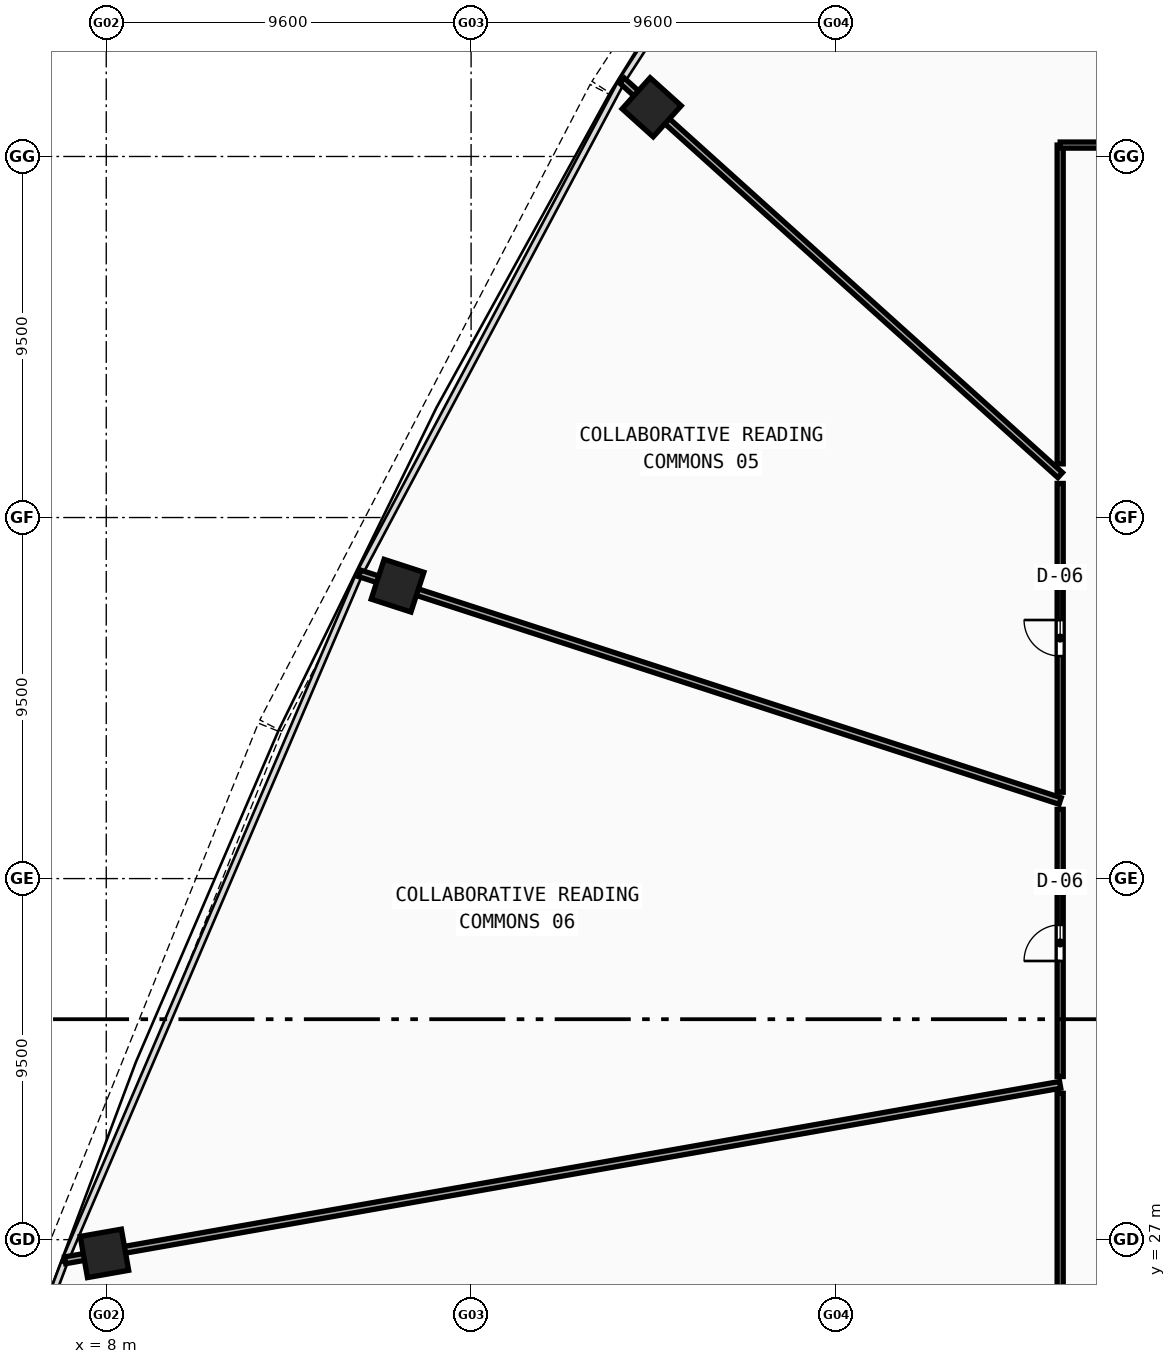
"""IFC4 building model, lengths in metres.
Left out: names, types, materials, properties, quantities, classifications, styles, units other than length and angle.
Written with IfcOpenShell. Run it as: python <this file> out.ifc"""

import sys

from ifc_helpers import new_model, si_unit, direction, frame, frame_2d, origin, origin_with_axes, origin_2d, place, context, subcontext, project, spatial, rectangle, hollow_rectangle, extrude, source, transform, mapped, element, fill, save


model = new_model("IFC4")
c1 = context("Model", 3, precision=1e-05, world=origin(), true_north=direction((0.0, 1.0)))
c2 = subcontext(c1, "Body", "Model", "MODEL_VIEW")
j1 = project(units=[si_unit("LENGTHUNIT", "METRE"), si_unit("PLANEANGLEUNIT", "RADIAN")], contexts=[c1])
p1 = place(None, origin())
s1 = spatial("IfcSite", under=j1, at=p1, CompositionType="ELEMENT")
p2 = place(p1, origin())
s2 = spatial("IfcBuilding", under=s1, at=p2, CompositionType="ELEMENT")
p3 = place(p2, frame((0.0, 0.0, 70.33)))
s3 = spatial("IfcBuildingStorey", under=s2, at=p3, CompositionType="ELEMENT", Elevation=70.33)
m1 = source(origin(), c2, "Body", "SweptSolid", [
    extrude(hollow_rectangle(XDim=1.1, YDim=1.1, WallThickness=0.045, at=origin_2d()), origin(), (0.0, 0.0, 1.0), 6.03),
])
for number, where, z_axis, x_axis in (
    (1, (22.351, 56.794, -0.26), (0.0, 0.0, 1.0), (-0.669, -0.743, 0.0)),
    (2, (15.665, 44.206, -0.26), (0.0, 0.0, 1.0), (-0.309, -0.951, 0.0)),
    (3, (7.952, 26.638, -0.26), (0.0, 0.0, 1.0), (0.174, -0.985, 0.0)),
):
    element("IfcColumn", number, at=place(p3, frame(where, z_axis=z_axis, x_axis=x_axis)), inside=s3, PredefinedType="COLUMN", context=c2, shape_type="MappedRepresentation", body=[
        mapped(m1, transform((0.0, 0.0, 0.0), scale=1.0)),
    ])
p4 = place(p3, frame((33.1, 47.116, 0.0), z_axis=(0.0, 0.0, 1.0), x_axis=(-0.743143105339, 0.669132516761, 0.0)))
e4 = element("IfcWall", 4, at=p4, inside=s3, PredefinedType="PARTITIONING", context=c2, shape_type="SweptSolid", body=[
    extrude(rectangle(XDim=15.514, YDim=0.18, at=frame_2d((7.757, 0.0))), origin(), (0.0, 0.0, 1.0), 2.42),
])
p5 = place(p3, frame((33.1, 38.541, 0.0), z_axis=(0.0, 0.0, 1.0), x_axis=(-0.951054245528, 0.309023982992, 0.0)))
e5 = element("IfcWall", 5, at=p5, inside=s3, PredefinedType="PARTITIONING", context=c2, shape_type="SweptSolid", body=[
    extrude(rectangle(XDim=19.383, YDim=0.18, at=frame_2d((9.691, 0.0))), origin(), (0.0, 0.0, 1.0), 2.42),
])
p6 = place(p3, frame((33.1, 31.073, 0.0), z_axis=(0.0, 0.0, 1.0), x_axis=(-0.984808509529, -0.173643887195, 0.0)))
e6 = element("IfcWall", 6, at=p6, inside=s3, PredefinedType="PARTITIONING", context=c2, shape_type="SweptSolid", body=[
    extrude(rectangle(XDim=26.586, YDim=0.18, at=frame_2d((13.293, 0.0))), origin(), (0.0, 0.0, 1.0), 2.42),
])
p7 = place(p3, frame((33.1, 24.8, 0.0), z_axis=(0.0, 0.0, 1.0), x_axis=(0.0, 1.0, 0.0)))
e7 = element("IfcWall", 7, at=p7, inside=s3, PredefinedType="PARTITIONING", context=c2, shape_type="SweptSolid", body=[
    extrude(rectangle(XDim=6.049, YDim=0.16, at=frame_2d((3.025, 0.0))), origin(), (0.0, 0.0, 1.0), 2.42),
])
p8 = place(p3, frame((33.1, 31.292, 0.0), z_axis=(0.0, 0.0, 1.0), x_axis=(0.0, 1.0, 0.0)))
e8 = element("IfcWall", 8, at=p8, inside=s3, PredefinedType="PARTITIONING", context=c2, shape_type="SweptSolid", body=[
    extrude(rectangle(XDim=7.029, YDim=0.16, at=frame_2d((3.515, 0.0))), origin(), (0.0, 0.0, 1.0), 2.42),
])
p9 = place(p8, frame((3.04, 0.0, 0.0)))
e9 = element("IfcOpeningElement", 9, at=p9, cuts=e8, PredefinedType="OPENING", context=c2, shape_type="SweptSolid", body=[
    extrude(rectangle(XDim=0.95, YDim=2.1, at=frame_2d((0.475, 1.05))), frame((0.0, 0.09, 0.0), z_axis=(0.0, -1.0, 0.0), x_axis=(1.0, 0.0, 0.0)), (0.0, 0.0, 1.0), 0.18),
])
p10 = place(p3, frame((33.1, 38.773, 0.0), z_axis=(0.0, 0.0, 1.0), x_axis=(0.0, 1.0, 0.0)))
e10 = element("IfcWall", 10, at=p10, inside=s3, PredefinedType="PARTITIONING", context=c2, shape_type="SweptSolid", body=[
    extrude(rectangle(XDim=8.124, YDim=0.16, at=frame_2d((4.062, 0.0))), origin(), (0.0, 0.0, 1.0), 2.42),
])
p11 = place(p10, frame((3.581, 0.0, 0.0)))
e11 = element("IfcOpeningElement", 11, at=p11, cuts=e10, PredefinedType="OPENING", context=c2, shape_type="SweptSolid", body=[
    extrude(rectangle(XDim=0.95, YDim=2.1, at=frame_2d((0.475, 1.05))), frame((0.0, 0.09, 0.0), z_axis=(0.0, -1.0, 0.0), x_axis=(1.0, 0.0, 0.0)), (0.0, 0.0, 1.0), 0.18),
])
p12 = place(p3, frame((33.1, 47.412, 0.0), z_axis=(0.0, 0.0, 1.0), x_axis=(0.0, 1.0, 0.0)))
e12 = element("IfcWall", 12, at=p12, inside=s3, PredefinedType="PARTITIONING", context=c2, shape_type="SweptSolid", body=[
    extrude(rectangle(XDim=8.388, YDim=0.16, at=frame_2d((4.194, 0.0))), origin(), (0.0, 0.0, 1.0), 2.42),
])
p13 = place(p3, frame((33.1, 55.8, 0.0), z_axis=(0.0, 0.0, 1.0), x_axis=(1.0, 0.0, 0.0)))
e13 = element("IfcWall", 13, at=p13, inside=s3, PredefinedType="PARTITIONING", context=c2, shape_type="SweptSolid", body=[
    extrude(rectangle(XDim=10.609, YDim=0.16, at=frame_2d((5.304, 0.0))), origin(), (0.0, 0.0, 1.0), 2.42),
])
p14 = place(p13, frame((4.635, 0.0, 0.0)))
e14 = element("IfcOpeningElement", 14, at=p14, cuts=e13, PredefinedType="OPENING", context=c2, shape_type="SweptSolid", body=[
    extrude(rectangle(XDim=0.95, YDim=2.1, at=frame_2d((0.475, 1.05))), frame((0.0, 0.09, 0.0), z_axis=(0.0, -1.0, 0.0), x_axis=(1.0, 0.0, 0.0)), (0.0, 0.0, 1.0), 0.18),
])
m2 = source(origin(), c2, "Body", "SweptSolid", [
    extrude(rectangle(XDim=0.95, YDim=2.1, at=frame_2d((0.475, 1.05))), frame((0.0, 0.025, 0.0), z_axis=(0.0, -1.0, 0.0), x_axis=(1.0, 0.0, 0.0)), (0.0, 0.0, 1.0), 0.05),
])
p15 = place(p11, origin_with_axes())
e15 = element("IfcDoor", 15, at=p15, inside=s3, OperationType="SINGLE_SWING_RIGHT", PredefinedType="DOOR", context=c2, shape_type="MappedRepresentation", body=[
    mapped(m2, transform((0.0, 0.0, 0.0), scale=1.0)),
])
fill(e11, e15)
p16 = place(p9, origin_with_axes())
e16 = element("IfcDoor", 16, at=p16, inside=s3, OperationType="SINGLE_SWING_LEFT", PredefinedType="DOOR", context=c2, shape_type="MappedRepresentation", body=[
    mapped(m2, transform((0.0, 0.0, 0.0), scale=1.0)),
])
fill(e9, e16)
save(model, sys.argv[1])
